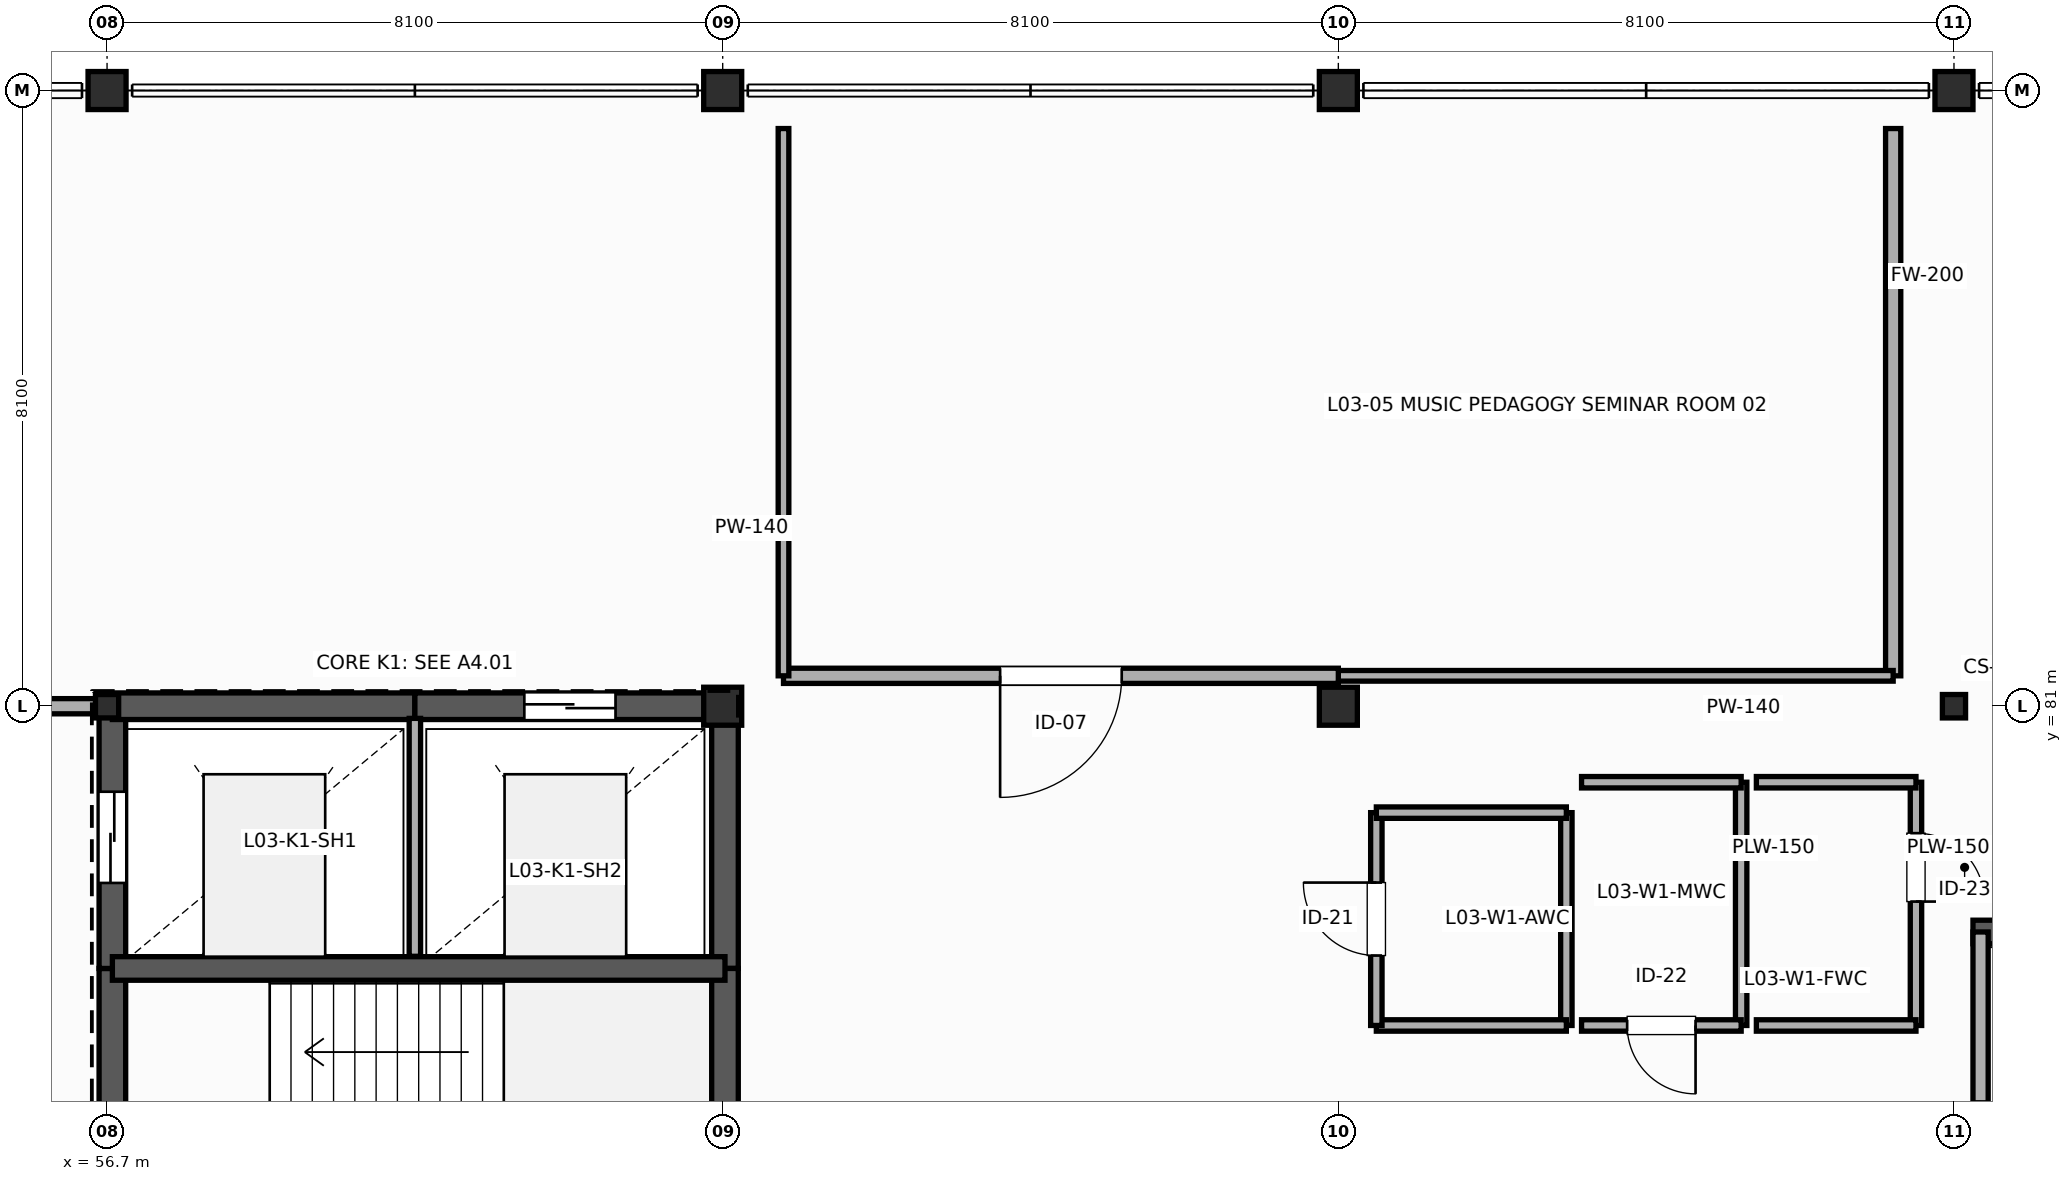
"""IFC4 building model, lengths in metres.
Left out: names, types, materials, properties, quantities, classifications, styles, units other than length and angle.
Written with IfcOpenShell. Run it as: python <this file> out.ifc"""

import sys

from ifc_helpers import new_model, si_unit, direction, frame, frame_2d, origin, origin_2d, place, context, subcontext, project, spatial, rectangle, i_section, extrude, element, fill, save


model = new_model("IFC4")
c1 = context("Model", 3, precision=1e-05, world=origin(), true_north=direction((0.0, 1.0)))
c2 = subcontext(c1, "Body", "Model", "MODEL_VIEW")
j1 = project(units=[si_unit("LENGTHUNIT", "METRE"), si_unit("PLANEANGLEUNIT", "RADIAN")], contexts=[c1])
p1 = place(None, origin())
s1 = spatial("IfcSite", under=j1, at=p1, CompositionType="ELEMENT")
p2 = place(p1, origin())
s2 = spatial("IfcBuilding", under=s1, at=p2, CompositionType="ELEMENT")
p3 = place(p2, frame((0.0, 0.0, 15.0)))
s3 = spatial("IfcBuildingStorey", under=s2, at=p3, CompositionType="ELEMENT", Elevation=15.0)
p4 = place(p3, frame((56.7, 81.0, 0.0), z_axis=(0.0, 0.0, 1.0), x_axis=(1.0, 0.0, 0.0)))
e1 = element("IfcColumn", 1, at=p4, inside=s3, PredefinedType="COLUMN", context=c2, shape_type="SweptSolid", body=[
    extrude(i_section(OverallWidth=0.305, OverallDepth=0.308, WebThickness=0.01, FlangeThickness=0.015, FilletRadius=0.015, at=origin_2d()), origin(), (0.0, 0.0, 1.0), 4.2),
])
for number, where, z_axis, x_axis in (
    (2, (56.7, 89.1, 0.0), (0.0, 0.0, 1.0), (1.0, 0.0, 0.0)),
    (3, (64.8, 81.0, 0.0), (0.0, 0.0, 1.0), (1.0, 0.0, 0.0)),
    (4, (64.8, 89.1, 0.0), (0.0, 0.0, 1.0), (1.0, 0.0, 0.0)),
    (5, (72.9, 81.0, 0.0), (0.0, 0.0, 1.0), (1.0, 0.0, 0.0)),
    (6, (72.9, 89.1, 0.0), (0.0, 0.0, 1.0), (1.0, 0.0, 0.0)),
):
    element("IfcColumn", number, at=place(p3, frame(where, z_axis=z_axis, x_axis=x_axis)), inside=s3, PredefinedType="COLUMN", context=c2, shape_type="SweptSolid", body=[
        extrude(rectangle(XDim=0.5, YDim=0.5, at=origin_2d()), origin(), (0.0, 0.0, 1.0), 4.2),
    ])
p5 = place(p3, frame((81.0, 81.0, 0.0), z_axis=(0.0, 0.0, 1.0), x_axis=(1.0, 0.0, 0.0)))
e7 = element("IfcColumn", 7, at=p5, inside=s3, PredefinedType="COLUMN", context=c2, shape_type="SweptSolid", body=[
    extrude(i_section(OverallWidth=0.305, OverallDepth=0.308, WebThickness=0.01, FlangeThickness=0.015, FilletRadius=0.015, at=origin_2d()), origin(), (0.0, 0.0, 1.0), 4.2),
])
p6 = place(p3, frame((81.0, 89.1, 0.0), z_axis=(0.0, 0.0, 1.0), x_axis=(1.0, 0.0, 0.0)))
e8 = element("IfcColumn", 8, at=p6, inside=s3, PredefinedType="COLUMN", context=c2, shape_type="SweptSolid", body=[
    extrude(rectangle(XDim=0.5, YDim=0.5, at=origin_2d()), origin(), (0.0, 0.0, 1.0), 4.2),
])
p7 = place(p3, frame((56.77, 73.13, 0.0), z_axis=(0.0, 0.0, 1.0), x_axis=(0.0, 1.0, 0.0)))
e9 = element("IfcWall", 9, at=p7, inside=s3, PredefinedType="SHEAR", context=c2, shape_type="SweptSolid", body=[
    extrude(rectangle(XDim=4.42, YDim=0.35, at=frame_2d((2.21, 0.0))), origin(), (0.0, 0.0, 1.0), 4.2),
])
p8 = place(p7, frame((1.35, 0.0, 0.0)))
e10 = element("IfcOpeningElement", 10, at=p8, cuts=e9, PredefinedType="OPENING", context=c2, shape_type="SweptSolid", body=[
    extrude(rectangle(XDim=1.2, YDim=2.25, at=frame_2d((0.6, 1.125))), frame((0.0, 0.185, 0.0), z_axis=(0.0, -1.0, 0.0), x_axis=(1.0, 0.0, 0.0)), (0.0, 0.0, 1.0), 0.37),
])
p9 = place(p3, frame((56.77, 77.55, 0.0), z_axis=(0.0, 0.0, 1.0), x_axis=(0.0, 1.0, 0.0)))
e11 = element("IfcWall", 11, at=p9, inside=s3, PredefinedType="SHEAR", context=c2, shape_type="SweptSolid", body=[
    extrude(rectangle(XDim=3.45, YDim=0.35, at=frame_2d((1.725, 0.0))), origin(), (0.0, 0.0, 1.0), 4.2),
])
p10 = place(p9, frame((1.125, 0.0, 0.0)))
e12 = element("IfcOpeningElement", 12, at=p10, cuts=e11, PredefinedType="OPENING", context=c2, shape_type="SweptSolid", body=[
    extrude(rectangle(XDim=1.2, YDim=2.2, at=frame_2d((0.6, 1.1))), frame((0.0, 0.185, 0.0), z_axis=(0.0, -1.0, 0.0), x_axis=(1.0, 0.0, 0.0)), (0.0, 0.0, 1.0), 0.37),
])
p11 = place(p3, frame((56.77, 81.0, 0.0), z_axis=(0.0, 0.0, 1.0), x_axis=(1.0, 0.0, 0.0)))
e13 = element("IfcWall", 13, at=p11, inside=s3, PredefinedType="SHEAR", context=c2, shape_type="SweptSolid", body=[
    extrude(rectangle(XDim=3.98, YDim=0.35, at=frame_2d((1.99, 0.0))), origin(), (0.0, 0.0, 1.0), 4.2),
])
p12 = place(p3, frame((60.75, 81.0, 0.0), z_axis=(0.0, 0.0, 1.0), x_axis=(1.0, 0.0, 0.0)))
e14 = element("IfcWall", 14, at=p12, inside=s3, PredefinedType="SHEAR", context=c2, shape_type="SweptSolid", body=[
    extrude(rectangle(XDim=4.08, YDim=0.35, at=frame_2d((2.04, 0.0))), origin(), (0.0, 0.0, 1.0), 4.2),
])
p13 = place(p12, frame((1.44, 0.0, 0.0)))
e15 = element("IfcOpeningElement", 15, at=p13, cuts=e14, PredefinedType="OPENING", context=c2, shape_type="SweptSolid", body=[
    extrude(rectangle(XDim=1.2, YDim=2.2, at=frame_2d((0.6, 1.1))), frame((0.0, 0.185, 0.0), z_axis=(0.0, -1.0, 0.0), x_axis=(1.0, 0.0, 0.0)), (0.0, 0.0, 1.0), 0.37),
])
p14 = place(p3, frame((64.83, 81.0, 0.0), z_axis=(0.0, 0.0, 1.0), x_axis=(0.0, -1.0, 0.0)))
e16 = element("IfcWall", 16, at=p14, inside=s3, PredefinedType="SHEAR", context=c2, shape_type="SweptSolid", body=[
    extrude(rectangle(XDim=3.45, YDim=0.35, at=frame_2d((1.725, 0.0))), origin(), (0.0, 0.0, 1.0), 4.2),
])
p15 = place(p3, frame((64.83, 77.55, 0.0), z_axis=(0.0, 0.0, 1.0), x_axis=(0.0, -1.0, 0.0)))
e17 = element("IfcWall", 17, at=p15, inside=s3, PredefinedType="SHEAR", context=c2, shape_type="SweptSolid", body=[
    extrude(rectangle(XDim=4.42, YDim=0.35, at=frame_2d((2.21, 0.0))), origin(), (0.0, 0.0, 1.0), 4.2),
])
p16 = place(p3, frame((56.77, 77.55, 0.0), z_axis=(0.0, 0.0, 1.0), x_axis=(1.0, 0.0, 0.0)))
e18 = element("IfcWall", 18, at=p16, inside=s3, PredefinedType="SHEAR", context=c2, shape_type="SweptSolid", body=[
    extrude(rectangle(XDim=8.06, YDim=0.31, at=frame_2d((4.03, 0.0))), origin(), (0.0, 0.0, 1.0), 4.2),
])
p17 = place(p3, frame((60.75, 77.71, 0.0), z_axis=(0.0, 0.0, 1.0), x_axis=(0.0, 1.0, 0.0)))
e19 = element("IfcWall", 19, at=p17, inside=s3, PredefinedType="PLUMBINGWALL", context=c2, shape_type="SweptSolid", body=[
    extrude(rectangle(XDim=3.13, YDim=0.15, at=frame_2d((1.565, 0.0))), origin(), (0.0, 0.0, 1.0), 3.85),
])
p18 = place(p3, frame((51.3, 81.0, 0.0), z_axis=(0.0, 0.0, 1.0), x_axis=(1.0, 0.0, 0.0)))
e20 = element("IfcWall", 20, at=p18, inside=s3, PredefinedType="PARTITIONING", context=c2, shape_type="SweptSolid", body=[
    extrude(rectangle(XDim=5.47, YDim=0.2, at=frame_2d((2.735, 0.0))), origin(), (0.0, 0.0, 1.0), 3.421),
])
p19 = place(p3, frame((89.795, 78.03, 0.0), z_axis=(0.0, 0.0, 1.0), x_axis=(-1.0, 0.0, 0.0)))
e21 = element("IfcWall", 21, at=p19, inside=s3, PredefinedType="SHEAR", context=c2, shape_type="SweptSolid", body=[
    extrude(rectangle(XDim=8.545, YDim=0.31, at=frame_2d((4.272, 0.0))), origin(), (0.0, 0.0, 1.0), 3.85),
])
p20 = place(p3, frame((81.35, 73.35, 0.0), z_axis=(0.0, 0.0, 1.0), x_axis=(0.0, 1.0, 0.0)))
e22 = element("IfcWall", 22, at=p20, inside=s3, PredefinedType="PARTITIONING", context=c2, shape_type="SweptSolid", body=[
    extrude(rectangle(XDim=4.68, YDim=0.2, at=frame_2d((2.34, 0.0))), origin(), (0.0, 0.0, 1.0), 3.5),
])
p21 = place(p20, frame((1.25, 0.0, 0.0)))
e23 = element("IfcOpeningElement", 23, at=p21, cuts=e22, PredefinedType="OPENING", context=c2, shape_type="SweptSolid", body=[
    extrude(rectangle(XDim=1.2, YDim=2.25, at=frame_2d((0.6, 1.125))), frame((0.0, 0.11, 0.0), z_axis=(0.0, -1.0, 0.0), x_axis=(1.0, 0.0, 0.0)), (0.0, 0.0, 1.0), 0.22),
])
p22 = place(p3, frame((75.9, 79.6, 0.0), z_axis=(0.0, 0.0, 1.0), x_axis=(0.0, -1.0, 0.0)))
e24 = element("IfcWall", 24, at=p22, inside=s3, PredefinedType="PLUMBINGWALL", context=c2, shape_type="SweptSolid", body=[
    extrude(rectangle(XDim=2.8, YDim=0.15, at=frame_2d((1.4, 0.0))), origin(), (0.0, 0.0, 1.0), 3.92),
])
p23 = place(p3, frame((75.9, 76.8, 0.0), z_axis=(0.0, 0.0, 1.0), x_axis=(-1.0, 0.0, 0.0)))
e25 = element("IfcWall", 25, at=p23, inside=s3, PredefinedType="PLUMBINGWALL", context=c2, shape_type="SweptSolid", body=[
    extrude(rectangle(XDim=2.5, YDim=0.15, at=frame_2d((1.25, 0.0))), origin(), (0.0, 0.0, 1.0), 3.92),
])
p24 = place(p3, frame((73.4, 76.8, 0.0), z_axis=(0.0, 0.0, 1.0), x_axis=(0.0, 1.0, 0.0)))
e26 = element("IfcWall", 26, at=p24, inside=s3, PredefinedType="PLUMBINGWALL", context=c2, shape_type="SweptSolid", body=[
    extrude(rectangle(XDim=2.8, YDim=0.15, at=frame_2d((1.4, 0.0))), origin(), (0.0, 0.0, 1.0), 3.92),
])
p25 = place(p24, frame((0.92, 0.0, 0.0)))
e27 = element("IfcOpeningElement", 27, at=p25, cuts=e26, PredefinedType="OPENING", context=c2, shape_type="SweptSolid", body=[
    extrude(rectangle(XDim=0.96, YDim=2.16, at=frame_2d((0.48, 1.08))), frame((0.0, 0.085, 0.0), z_axis=(0.0, -1.0, 0.0), x_axis=(1.0, 0.0, 0.0)), (0.0, 0.0, 1.0), 0.17),
])
p26 = place(p3, frame((73.4, 79.6, 0.0), z_axis=(0.0, 0.0, 1.0), x_axis=(1.0, 0.0, 0.0)))
e28 = element("IfcWall", 28, at=p26, inside=s3, PredefinedType="PLUMBINGWALL", context=c2, shape_type="SweptSolid", body=[
    extrude(rectangle(XDim=2.5, YDim=0.15, at=frame_2d((1.25, 0.0))), origin(), (0.0, 0.0, 1.0), 3.92),
])
p27 = place(p3, frame((78.2, 80.0, 0.0), z_axis=(0.0, 0.0, 1.0), x_axis=(0.0, -1.0, 0.0)))
e29 = element("IfcWall", 29, at=p27, inside=s3, PredefinedType="PLUMBINGWALL", context=c2, shape_type="SweptSolid", body=[
    extrude(rectangle(XDim=3.2, YDim=0.15, at=frame_2d((1.6, 0.0))), origin(), (0.0, 0.0, 1.0), 3.92),
])
p28 = place(p3, frame((78.2, 76.8, 0.0), z_axis=(0.0, 0.0, 1.0), x_axis=(-1.0, 0.0, 0.0)))
e30 = element("IfcWall", 30, at=p28, inside=s3, PredefinedType="PLUMBINGWALL", context=c2, shape_type="SweptSolid", body=[
    extrude(rectangle(XDim=2.1, YDim=0.15, at=frame_2d((1.05, 0.0))), origin(), (0.0, 0.0, 1.0), 3.92),
])
p29 = place(p28, frame((0.6, 0.0, 0.0)))
e31 = element("IfcOpeningElement", 31, at=p29, cuts=e30, PredefinedType="OPENING", context=c2, shape_type="SweptSolid", body=[
    extrude(rectangle(XDim=0.9, YDim=2.1, at=frame_2d((0.45, 1.05))), frame((0.0, 0.085, 0.0), z_axis=(0.0, -1.0, 0.0), x_axis=(1.0, 0.0, 0.0)), (0.0, 0.0, 1.0), 0.17),
])
p30 = place(p3, frame((76.1, 80.0, 0.0), z_axis=(0.0, 0.0, 1.0), x_axis=(1.0, 0.0, 0.0)))
e32 = element("IfcWall", 32, at=p30, inside=s3, PredefinedType="PLUMBINGWALL", context=c2, shape_type="SweptSolid", body=[
    extrude(rectangle(XDim=2.1, YDim=0.15, at=frame_2d((1.05, 0.0))), origin(), (0.0, 0.0, 1.0), 3.92),
])
p31 = place(p3, frame((80.5, 80.0, 0.0), z_axis=(0.0, 0.0, 1.0), x_axis=(0.0, -1.0, 0.0)))
e33 = element("IfcWall", 33, at=p31, inside=s3, PredefinedType="PLUMBINGWALL", context=c2, shape_type="SweptSolid", body=[
    extrude(rectangle(XDim=3.2, YDim=0.15, at=frame_2d((1.6, 0.0))), origin(), (0.0, 0.0, 1.0), 3.92),
])
p32 = place(p31, frame((0.67, 0.0, 0.0)))
e34 = element("IfcOpeningElement", 34, at=p32, cuts=e33, PredefinedType="OPENING", context=c2, shape_type="SweptSolid", body=[
    extrude(rectangle(XDim=0.9, YDim=2.2, at=frame_2d((0.45, 1.1))), frame((0.0, 0.085, 0.0), z_axis=(0.0, -1.0, 0.0), x_axis=(1.0, 0.0, 0.0)), (0.0, 0.0, 1.0), 0.17),
])
for number, where, z_axis, x_axis in (
    (35, (80.5, 76.8, 0.0), (0.0, 0.0, 1.0), (-1.0, 0.0, 0.0)),
    (36, (78.4, 80.0, 0.0), (0.0, 0.0, 1.0), (1.0, 0.0, 0.0)),
):
    element("IfcWall", number, at=place(p3, frame(where, z_axis=z_axis, x_axis=x_axis)), inside=s3, PredefinedType="PLUMBINGWALL", context=c2, shape_type="SweptSolid", body=[
        extrude(rectangle(XDim=2.1, YDim=0.15, at=frame_2d((1.05, 0.0))), origin(), (0.0, 0.0, 1.0), 3.92),
    ])
p33 = place(p3, frame((80.2, 88.6, 0.0), z_axis=(0.0, 0.0, 1.0), x_axis=(0.0, -1.0, 0.0)))
e37 = element("IfcWall", 37, at=p33, inside=s3, PredefinedType="PARTITIONING", context=c2, shape_type="SweptSolid", body=[
    extrude(rectangle(XDim=7.2, YDim=0.2, at=frame_2d((3.6, 0.0))), origin(), (0.0, 0.0, 1.0), 3.92),
])
p34 = place(p3, frame((80.2, 81.4, 0.0), z_axis=(0.0, 0.0, 1.0), x_axis=(-1.0, 0.0, 0.0)))
e38 = element("IfcWall", 38, at=p34, inside=s3, PredefinedType="PARTITIONING", context=c2, shape_type="SweptSolid", body=[
    extrude(rectangle(XDim=7.3, YDim=0.14, at=frame_2d((3.65, 0.0))), origin(), (0.0, 0.0, 1.0), 3.054),
])
p35 = place(p3, frame((72.9, 81.4, 0.0), z_axis=(0.0, 0.0, 1.0), x_axis=(-1.0, 0.0, 0.0)))
e39 = element("IfcWall", 39, at=p35, inside=s3, PredefinedType="PARTITIONING", context=c2, shape_type="SweptSolid", body=[
    extrude(rectangle(XDim=7.3, YDim=0.2, at=frame_2d((3.65, 0.0))), origin(), (0.0, 0.0, 1.0), 3.154),
])
p36 = place(p35, frame((2.85, 0.0, 0.0)))
e40 = element("IfcOpeningElement", 40, at=p36, cuts=e39, PredefinedType="OPENING", context=c2, shape_type="SweptSolid", body=[
    extrude(rectangle(XDim=1.6, YDim=2.4, at=frame_2d((0.8, 1.2))), frame((0.0, 0.11, 0.0), z_axis=(0.0, -1.0, 0.0), x_axis=(1.0, 0.0, 0.0)), (0.0, 0.0, 1.0), 0.22),
])
p37 = place(p3, frame((65.6, 81.4, 0.0), z_axis=(0.0, 0.0, 1.0), x_axis=(0.0, 1.0, 0.0)))
e41 = element("IfcWall", 41, at=p37, inside=s3, PredefinedType="PARTITIONING", context=c2, shape_type="SweptSolid", body=[
    extrude(rectangle(XDim=7.2, YDim=0.14, at=frame_2d((3.6, 0.0))), origin(), (0.0, 0.0, 1.0), 3.92),
])
p38 = place(p10, origin())
e42 = element("IfcDoor", 42, at=p38, inside=s3, OperationType="SLIDING_TO_LEFT", PredefinedType="DOOR", context=c2, shape_type="SweptSolid", body=[
    extrude(rectangle(XDim=1.2, YDim=2.2, at=frame_2d((0.6, 1.1))), frame((0.0, 0.025, 0.0), z_axis=(0.0, -1.0, 0.0), x_axis=(1.0, 0.0, 0.0)), (0.0, 0.0, 1.0), 0.05),
])
fill(e12, e42)
p39 = place(p13, origin())
e43 = element("IfcDoor", 43, at=p39, inside=s3, OperationType="SLIDING_TO_LEFT", PredefinedType="DOOR", context=c2, shape_type="SweptSolid", body=[
    extrude(rectangle(XDim=1.2, YDim=2.2, at=frame_2d((0.6, 1.1))), frame((0.0, 0.025, 0.0), z_axis=(0.0, -1.0, 0.0), x_axis=(1.0, 0.0, 0.0)), (0.0, 0.0, 1.0), 0.05),
])
fill(e15, e43)
p40 = place(p21, origin())
e44 = element("IfcDoor", 44, at=p40, inside=s3, OperationType="SINGLE_SWING_LEFT", PredefinedType="DOOR", context=c2, shape_type="SweptSolid", body=[
    extrude(rectangle(XDim=1.2, YDim=2.25, at=frame_2d((0.6, 1.125))), frame((0.0, 0.025, 0.0), z_axis=(0.0, -1.0, 0.0), x_axis=(1.0, 0.0, 0.0)), (0.0, 0.0, 1.0), 0.05),
])
fill(e23, e44)
p41 = place(p25, origin())
e45 = element("IfcDoor", 45, at=p41, inside=s3, OperationType="SINGLE_SWING_RIGHT", PredefinedType="DOOR", context=c2, shape_type="SweptSolid", body=[
    extrude(rectangle(XDim=0.96, YDim=2.16, at=frame_2d((0.48, 1.08))), frame((0.0, 0.025, 0.0), z_axis=(0.0, -1.0, 0.0), x_axis=(1.0, 0.0, 0.0)), (0.0, 0.0, 1.0), 0.05),
])
fill(e27, e45)
p42 = place(p29, origin())
e46 = element("IfcDoor", 46, at=p42, inside=s3, OperationType="SINGLE_SWING_LEFT", PredefinedType="DOOR", context=c2, shape_type="SweptSolid", body=[
    extrude(rectangle(XDim=0.9, YDim=2.1, at=frame_2d((0.45, 1.05))), frame((0.0, 0.025, 0.0), z_axis=(0.0, -1.0, 0.0), x_axis=(1.0, 0.0, 0.0)), (0.0, 0.0, 1.0), 0.05),
])
fill(e31, e46)
p43 = place(p32, origin())
e47 = element("IfcDoor", 47, at=p43, inside=s3, OperationType="SINGLE_SWING_RIGHT", PredefinedType="DOOR", context=c2, shape_type="SweptSolid", body=[
    extrude(rectangle(XDim=0.9, YDim=2.2, at=frame_2d((0.45, 1.1))), frame((0.0, 0.025, 0.0), z_axis=(0.0, -1.0, 0.0), x_axis=(1.0, 0.0, 0.0)), (0.0, 0.0, 1.0), 0.05),
])
fill(e34, e47)
p44 = place(p36, origin())
e48 = element("IfcDoor", 48, at=p44, inside=s3, OperationType="SINGLE_SWING_RIGHT", PredefinedType="DOOR", context=c2, shape_type="SweptSolid", body=[
    extrude(rectangle(XDim=1.6, YDim=2.4, at=frame_2d((0.8, 1.2))), frame((0.0, 0.025, 0.0), z_axis=(0.0, -1.0, 0.0), x_axis=(1.0, 0.0, 0.0)), (0.0, 0.0, 1.0), 0.05),
])
fill(e40, e48)
save(model, sys.argv[1])
